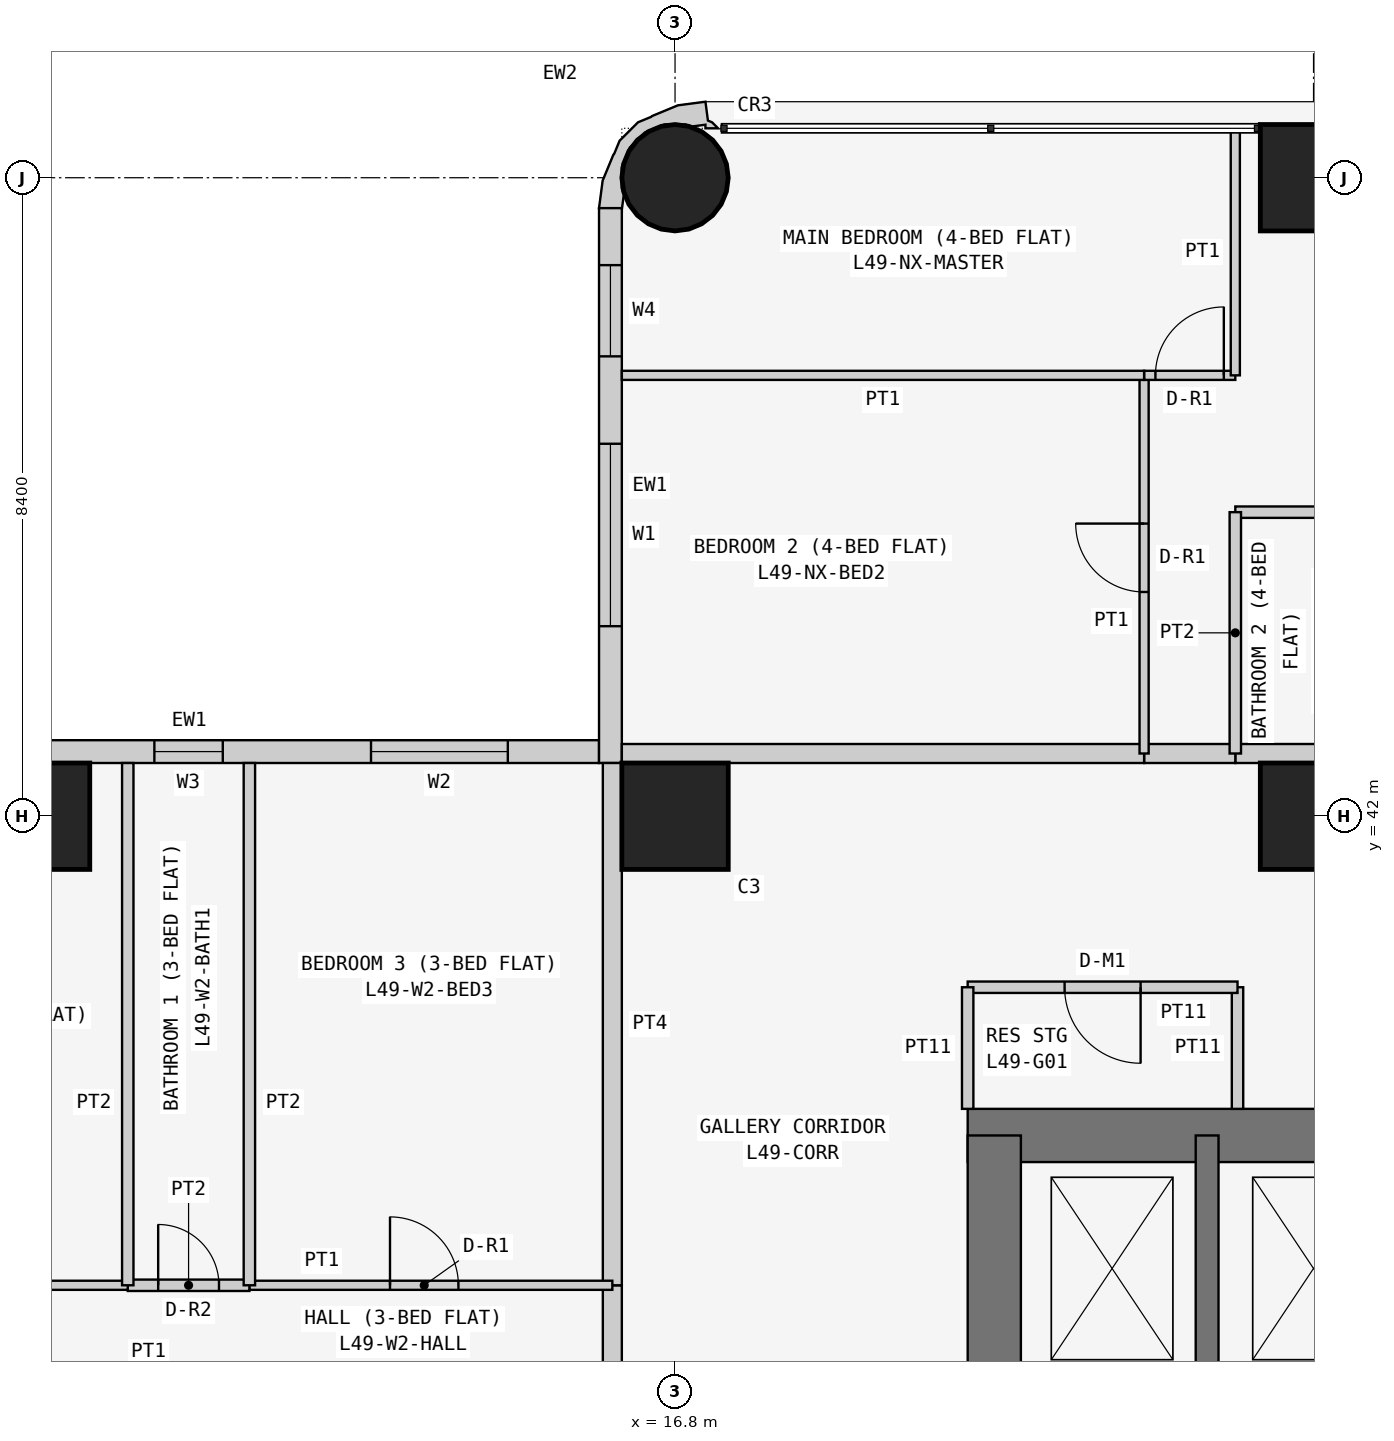
"""IFC4 building model, lengths in metres.
Left out: names, types, materials, properties, quantities, classifications, styles, units other than length and angle.
Written with IfcOpenShell. Run it as: python <this file> out.ifc"""

import sys

from ifc_helpers import new_model, si_unit, direction, frame, frame_2d, origin, origin_2d, place, context, subcontext, project, spatial, polyline, rectangle, circle, outline, extrude, element, fill, save


model = new_model("IFC4")
c1 = context("Model", 3, precision=1e-05, world=origin(), true_north=direction((0.0, 1.0)))
c2 = subcontext(c1, "Body", "Model", "MODEL_VIEW")
j1 = project(units=[si_unit("LENGTHUNIT", "METRE"), si_unit("PLANEANGLEUNIT", "RADIAN")], contexts=[c1])
p1 = place(None, origin())
s1 = spatial("IfcSite", under=j1, at=p1, CompositionType="ELEMENT")
p2 = place(p1, origin())
s2 = spatial("IfcBuilding", under=s1, at=p2, CompositionType="ELEMENT")
p3 = place(p2, frame((0.0, 0.0, 190.5)))
s3 = spatial("IfcBuildingStorey", under=s2, at=p3, CompositionType="ELEMENT", Elevation=190.5)
for number, where, z_axis, x_axis in (
    (1, (8.4, 42.0, 0.0), (0.0, 0.0, 1.0), (1.0, 0.0, 0.0)),
    (2, (16.8, 42.0, 0.0), (0.0, 0.0, 1.0), (1.0, 0.0, 0.0)),
):
    element("IfcColumn", number, at=place(p3, frame(where, z_axis=z_axis, x_axis=x_axis)), inside=s3, PredefinedType="COLUMN", context=c2, shape_type="SweptSolid", body=[
        extrude(rectangle(XDim=1.4, YDim=1.4, at=origin_2d()), origin(), (0.0, 0.0, 1.0), 3.6),
    ])
p4 = place(p3, frame((16.8, 50.4, 0.0), z_axis=(0.0, 0.0, 1.0), x_axis=(1.0, 0.0, 0.0)))
e3 = element("IfcColumn", 3, at=p4, inside=s3, PredefinedType="COLUMN", context=c2, shape_type="SweptSolid", body=[
    extrude(circle(Radius=0.7, at=origin_2d()), origin(), (0.0, 0.0, 1.0), 3.6),
])
for number, where, z_axis, x_axis in (
    (4, (25.2, 42.0, 0.0), (0.0, 0.0, 1.0), (1.0, 0.0, 0.0)),
    (5, (25.2, 50.4, 0.0), (0.0, 0.0, 1.0), (1.0, 0.0, 0.0)),
):
    element("IfcColumn", number, at=place(p3, frame(where, z_axis=z_axis, x_axis=x_axis)), inside=s3, PredefinedType="COLUMN", context=c2, shape_type="SweptSolid", body=[
        extrude(rectangle(XDim=1.4, YDim=1.4, at=origin_2d()), origin(), (0.0, 0.0, 1.0), 3.6),
    ])
p5 = place(p3, frame((37.8, 37.8, 0.0), z_axis=(0.0, 0.0, 1.0), x_axis=(-1.0, 0.0, 0.0)))
e6 = element("IfcWall", 6, at=p5, inside=s3, PredefinedType="SHEAR", context=c2, shape_type="SweptSolid", body=[
    extrude(rectangle(XDim=17.15, YDim=0.7, at=frame_2d((8.575, 0.0))), origin(), (0.0, 0.0, 1.0), 3.6),
])
p6 = place(p3, frame((21.0, 37.8, 0.0), z_axis=(0.0, 0.0, 1.0), x_axis=(0.0, -1.0, 0.0)))
e7 = element("IfcWall", 7, at=p6, inside=s3, PredefinedType="SHEAR", context=c2, shape_type="SweptSolid", body=[
    extrude(rectangle(XDim=17.15, YDim=0.7, at=frame_2d((8.575, 0.0))), origin(), (0.0, 0.0, 1.0), 3.6),
])
p7 = place(p6, frame((5.4, 0.0, 0.0)))
e8 = element("IfcOpeningElement", 8, at=p7, cuts=e7, PredefinedType="OPENING", context=c2, shape_type="SweptSolid", body=[
    extrude(rectangle(XDim=1.2, YDim=2.1, at=frame_2d((0.6, 1.05))), frame((0.0, 0.36, 0.0), z_axis=(0.0, -1.0, 0.0), x_axis=(1.0, 0.0, 0.0)), (0.0, 0.0, 1.0), 0.72),
])
p8 = place(p3, frame((23.8, 34.6, 0.0), z_axis=(0.0, 0.0, 1.0), x_axis=(0.0, 1.0, 0.0)))
e9 = element("IfcWall", 9, at=p8, inside=s3, PredefinedType="SHEAR", context=c2, shape_type="SweptSolid", body=[
    extrude(rectangle(XDim=3.2, YDim=0.3, at=frame_2d((1.6, 0.0))), origin(), (0.0, 0.0, 1.0), 3.6),
])
p9 = place(p3, frame((15.8, 42.85, 0.0), z_axis=(0.0, 0.0, 1.0), x_axis=(-1.0, 0.0, 0.0)))
e10 = element("IfcWall", 10, at=p9, inside=s3, PredefinedType="SOLIDWALL", context=c2, shape_type="SweptSolid", body=[
    extrude(rectangle(XDim=15.4, YDim=0.3, at=frame_2d((7.7, 0.0))), origin(), (0.0, 0.0, 1.0), 3.45),
])
p10 = place(p9, frame((1.2, 0.0, 0.9)))
e11 = element("IfcOpeningElement", 11, at=p10, cuts=e10, PredefinedType="OPENING", context=c2, shape_type="SweptSolid", body=[
    extrude(rectangle(XDim=1.8, YDim=1.5, at=frame_2d((0.9, 0.75))), frame((0.0, 0.16, 0.0), z_axis=(0.0, -1.0, 0.0), x_axis=(1.0, 0.0, 0.0)), (0.0, 0.0, 1.0), 0.32),
])
p11 = place(p9, frame((4.95, 0.0, 1.5)))
e12 = element("IfcOpeningElement", 12, at=p11, cuts=e10, PredefinedType="OPENING", context=c2, shape_type="SweptSolid", body=[
    extrude(rectangle(XDim=0.9, YDim=0.7, at=frame_2d((0.45, 0.35))), frame((0.0, 0.16, 0.0), z_axis=(0.0, -1.0, 0.0), x_axis=(1.0, 0.0, 0.0)), (0.0, 0.0, 1.0), 0.32),
])
p12 = place(p9, frame((8.5, 0.0, 0.9)))
e13 = element("IfcOpeningElement", 13, at=p12, cuts=e10, PredefinedType="OPENING", context=c2, shape_type="SweptSolid", body=[
    extrude(rectangle(XDim=1.8, YDim=1.5, at=frame_2d((0.9, 0.75))), frame((0.0, 0.16, 0.0), z_axis=(0.0, -1.0, 0.0), x_axis=(1.0, 0.0, 0.0)), (0.0, 0.0, 1.0), 0.32),
])
p13 = place(p9, frame((12.5, 0.0, 0.0)))
e14 = element("IfcOpeningElement", 14, at=p13, cuts=e10, PredefinedType="OPENING", context=c2, shape_type="SweptSolid", body=[
    extrude(rectangle(XDim=0.9, YDim=2.4, at=frame_2d((0.45, 1.2))), frame((0.0, 0.16, 0.0), z_axis=(0.0, -1.0, 0.0), x_axis=(1.0, 0.0, 0.0)), (0.0, 0.0, 1.0), 0.32),
])
p14 = place(p9, frame((13.5, 0.0, 0.9)))
e15 = element("IfcOpeningElement", 15, at=p14, cuts=e10, PredefinedType="OPENING", context=c2, shape_type="SweptSolid", body=[
    extrude(rectangle(XDim=1.2, YDim=1.5, at=frame_2d((0.6, 0.75))), frame((0.0, 0.16, 0.0), z_axis=(0.0, -1.0, 0.0), x_axis=(1.0, 0.0, 0.0)), (0.0, 0.0, 1.0), 0.32),
])
p15 = place(p3, frame((15.95, 50.0, 0.0), z_axis=(0.0, 0.0, 1.0), x_axis=(0.0, -1.0, 0.0)))
e16 = element("IfcWall", 16, at=p15, inside=s3, PredefinedType="SOLIDWALL", context=c2, shape_type="SweptSolid", body=[
    extrude(rectangle(XDim=7.3, YDim=0.3, at=frame_2d((3.65, 0.0))), origin(), (0.0, 0.0, 1.0), 3.45),
])
p16 = place(p15, frame((3.1, 0.0, 0.9)))
e17 = element("IfcOpeningElement", 17, at=p16, cuts=e16, PredefinedType="OPENING", context=c2, shape_type="SweptSolid", body=[
    extrude(rectangle(XDim=2.4, YDim=1.5, at=frame_2d((1.2, 0.75))), frame((0.0, 0.16, 0.0), z_axis=(0.0, -1.0, 0.0), x_axis=(1.0, 0.0, 0.0)), (0.0, 0.0, 1.0), 0.32),
])
p17 = place(p15, frame((0.75, 0.0, 0.9)))
e18 = element("IfcOpeningElement", 18, at=p17, cuts=e16, PredefinedType="OPENING", context=c2, shape_type="SweptSolid", body=[
    extrude(rectangle(XDim=1.2, YDim=1.5, at=frame_2d((0.6, 0.75))), frame((0.0, 0.16, 0.0), z_axis=(0.0, -1.0, 0.0), x_axis=(1.0, 0.0, 0.0)), (0.0, 0.0, 1.0), 0.32),
])
p18 = place(p3, frame((17.312, 50.988, 0.0), z_axis=(0.0, 0.0, 1.0), x_axis=(-0.439933741929, 0.898030234854, 0.0)))
e19 = element("IfcWall", 19, at=p18, inside=s3, PredefinedType="SOLIDWALL", context=c2, shape_type="SweptSolid", body=[
    extrude(outline(polyline([(0.138, -0.039), (0.182, -0.0), (0.419, -0.08), (0.536, 0.266), (0.559, 0.631), (0.555, 0.651), (0.566, 0.836), (0.456, 1.159), (0.333, 1.298), (0.324, 1.316), (0.082, 1.591), (-0.222, 1.793), (-0.39, 1.541), (-0.372, 1.532), (-0.195, 1.414), (-0.12, 1.41), (0.131, 1.287), (0.315, 1.078), (0.406, 0.814), (0.388, 0.536), (0.265, 0.285), (0.209, 0.236), (0.148, 0.053), (0.105, 0.074), (0.032, -0.076), (0.138, -0.039)])), origin(), (0.0, 0.0, 1.0), 3.45),
])
p19 = place(p3, frame((24.2, 38.15, 0.0), z_axis=(0.0, 0.0, 1.0), x_axis=(0.0, 1.0, 0.0)))
e20 = element("IfcWall", 20, at=p19, inside=s3, PredefinedType="PARTITIONING", context=c2, shape_type="SweptSolid", body=[
    extrude(rectangle(XDim=1.6, YDim=0.15, at=frame_2d((0.8, 0.0))), origin(), (0.0, 0.0, 1.0), 3.45),
])
p20 = place(p3, frame((24.2, 39.75, 0.0), z_axis=(0.0, 0.0, 1.0), x_axis=(-1.0, 0.0, 0.0)))
e21 = element("IfcWall", 21, at=p20, inside=s3, PredefinedType="PARTITIONING", context=c2, shape_type="SweptSolid", body=[
    extrude(rectangle(XDim=3.55, YDim=0.15, at=frame_2d((1.775, 0.0))), origin(), (0.0, 0.0, 1.0), 3.45),
])
p21 = place(p20, frame((1.275, 0.0, 0.0)))
e22 = element("IfcOpeningElement", 22, at=p21, cuts=e21, PredefinedType="OPENING", context=c2, shape_type="SweptSolid", body=[
    extrude(rectangle(XDim=1.0, YDim=2.1, at=frame_2d((0.5, 1.05))), frame((0.0, 0.085, 0.0), z_axis=(0.0, -1.0, 0.0), x_axis=(1.0, 0.0, 0.0)), (0.0, 0.0, 1.0), 0.17),
])
p22 = place(p3, frame((20.65, 39.75, 0.0), z_axis=(0.0, 0.0, 1.0), x_axis=(0.0, -1.0, 0.0)))
e23 = element("IfcWall", 23, at=p22, inside=s3, PredefinedType="PARTITIONING", context=c2, shape_type="SweptSolid", body=[
    extrude(rectangle(XDim=1.6, YDim=0.15, at=frame_2d((0.8, 0.0))), origin(), (0.0, 0.0, 1.0), 3.45),
])
p23 = place(p3, frame((24.171, 42.825, 0.0), z_axis=(0.0, 0.0, 1.0), x_axis=(1.0, 0.0, 0.0)))
e24 = element("IfcWall", 24, at=p23, inside=s3, PredefinedType="PARTITIONING", context=c2, shape_type="SweptSolid", body=[
    extrude(rectangle(XDim=2.629, YDim=0.25, at=frame_2d((1.314, 0.0))), origin(), (0.0, 0.0, 1.0), 3.45),
])
p24 = place(p3, frame((22.971, 42.825, 0.0), z_axis=(0.0, 0.0, 1.0), x_axis=(1.0, 0.0, 0.0)))
e25 = element("IfcWall", 25, at=p24, inside=s3, PredefinedType="PARTITIONING", context=c2, shape_type="SweptSolid", body=[
    extrude(rectangle(XDim=1.2, YDim=0.25, at=frame_2d((0.6, 0.0))), origin(), (0.0, 0.0, 1.0), 3.45),
])
p25 = place(p3, frame((16.1, 42.825, 0.0), z_axis=(0.0, 0.0, 1.0), x_axis=(1.0, 0.0, 0.0)))
e26 = element("IfcWall", 26, at=p25, inside=s3, PredefinedType="PARTITIONING", context=c2, shape_type="SweptSolid", body=[
    extrude(rectangle(XDim=6.871, YDim=0.25, at=frame_2d((3.436, 0.0))), origin(), (0.0, 0.0, 1.0), 3.45),
])
p26 = place(p3, frame((15.975, 34.629, 0.0), z_axis=(0.0, 0.0, 1.0), x_axis=(0.0, 1.0, 0.0)))
e27 = element("IfcWall", 27, at=p26, inside=s3, PredefinedType="PARTITIONING", context=c2, shape_type="SweptSolid", body=[
    extrude(rectangle(XDim=1.2, YDim=0.25, at=frame_2d((0.6, 0.0))), origin(), (0.0, 0.0, 1.0), 3.45),
])
p27 = place(p3, frame((15.975, 35.829, 0.0), z_axis=(0.0, 0.0, 1.0), x_axis=(0.0, 1.0, 0.0)))
e28 = element("IfcWall", 28, at=p27, inside=s3, PredefinedType="PARTITIONING", context=c2, shape_type="SweptSolid", body=[
    extrude(rectangle(XDim=6.871, YDim=0.25, at=frame_2d((3.436, 0.0))), origin(), (0.0, 0.0, 1.0), 3.45),
])
p28 = place(p3, frame((26.8, 46.0, 0.0), z_axis=(0.0, 0.0, 1.0), x_axis=(-1.0, 0.0, 0.0)))
e29 = element("IfcWall", 29, at=p28, inside=s3, PredefinedType="PARTITIONING", context=c2, shape_type="SweptSolid", body=[
    extrude(rectangle(XDim=2.629, YDim=0.15, at=frame_2d((1.314, 0.0))), origin(), (0.0, 0.0, 1.0), 3.45),
])
p29 = place(p3, frame((24.171, 46.0, 0.0), z_axis=(0.0, 0.0, 1.0), x_axis=(0.0, -1.0, 0.0)))
e30 = element("IfcWall", 30, at=p29, inside=s3, PredefinedType="PARTITIONING", context=c2, shape_type="SweptSolid", body=[
    extrude(rectangle(XDim=3.175, YDim=0.15, at=frame_2d((1.587, 0.0))), origin(), (0.0, 0.0, 1.0), 3.45),
])
p30 = place(p3, frame((22.971, 42.825, 0.0), z_axis=(0.0, 0.0, 1.0), x_axis=(0.0, 1.0, 0.0)))
e31 = element("IfcWall", 31, at=p30, inside=s3, PredefinedType="PARTITIONING", context=c2, shape_type="SweptSolid", body=[
    extrude(rectangle(XDim=4.975, YDim=0.12, at=frame_2d((2.488, 0.0))), origin(), (0.0, 0.0, 1.0), 3.45),
])
p31 = place(p30, frame((2.125, 0.0, 0.0)))
e32 = element("IfcOpeningElement", 32, at=p31, cuts=e31, PredefinedType="OPENING", context=c2, shape_type="SweptSolid", body=[
    extrude(rectangle(XDim=0.9, YDim=2.1, at=frame_2d((0.45, 1.05))), frame((0.0, 0.07, 0.0), z_axis=(0.0, -1.0, 0.0), x_axis=(1.0, 0.0, 0.0)), (0.0, 0.0, 1.0), 0.14),
])
p32 = place(p3, frame((22.971, 47.8, 0.0), z_axis=(0.0, 0.0, 1.0), x_axis=(1.0, 0.0, 0.0)))
e33 = element("IfcWall", 33, at=p32, inside=s3, PredefinedType="PARTITIONING", context=c2, shape_type="SweptSolid", body=[
    extrude(rectangle(XDim=1.2, YDim=0.12, at=frame_2d((0.6, 0.0))), origin(), (0.0, 0.0, 1.0), 3.45),
])
p33 = place(p32, frame((0.149, 0.0, 0.0)))
e34 = element("IfcOpeningElement", 34, at=p33, cuts=e33, PredefinedType="OPENING", context=c2, shape_type="SweptSolid", body=[
    extrude(rectangle(XDim=0.9, YDim=2.1, at=frame_2d((0.45, 1.05))), frame((0.0, 0.07, 0.0), z_axis=(0.0, -1.0, 0.0), x_axis=(1.0, 0.0, 0.0)), (0.0, 0.0, 1.0), 0.14),
])
p34 = place(p3, frame((24.171, 47.8, 0.0), z_axis=(0.0, 0.0, 1.0), x_axis=(0.0, 1.0, 0.0)))
e35 = element("IfcWall", 35, at=p34, inside=s3, PredefinedType="PARTITIONING", context=c2, shape_type="SweptSolid", body=[
    extrude(rectangle(XDim=3.25, YDim=0.12, at=frame_2d((1.625, 0.0))), origin(), (0.0, 0.0, 1.0), 3.45),
])
p35 = place(p3, frame((22.971, 47.8, 0.0), z_axis=(0.0, 0.0, 1.0), x_axis=(-1.0, 0.0, 0.0)))
e36 = element("IfcWall", 36, at=p35, inside=s3, PredefinedType="PARTITIONING", context=c2, shape_type="SweptSolid", body=[
    extrude(rectangle(XDim=6.871, YDim=0.12, at=frame_2d((3.436, 0.0))), origin(), (0.0, 0.0, 1.0), 3.45),
])
p36 = place(p3, frame((11.2, 35.829, 0.0), z_axis=(0.0, 0.0, 1.0), x_axis=(1.0, 0.0, 0.0)))
e37 = element("IfcWall", 37, at=p36, inside=s3, PredefinedType="PARTITIONING", context=c2, shape_type="SweptSolid", body=[
    extrude(rectangle(XDim=4.775, YDim=0.12, at=frame_2d((2.388, 0.0))), origin(), (0.0, 0.0, 1.0), 3.45),
])
p37 = place(p36, frame((1.85, 0.0, 0.0)))
e38 = element("IfcOpeningElement", 38, at=p37, cuts=e37, PredefinedType="OPENING", context=c2, shape_type="SweptSolid", body=[
    extrude(rectangle(XDim=0.9, YDim=2.1, at=frame_2d((0.45, 1.05))), frame((0.0, 0.07, 0.0), z_axis=(0.0, -1.0, 0.0), x_axis=(1.0, 0.0, 0.0)), (0.0, 0.0, 1.0), 0.14),
])
p38 = place(p3, frame((9.6, 35.829, 0.0), z_axis=(0.0, 0.0, 1.0), x_axis=(1.0, 0.0, 0.0)))
e39 = element("IfcWall", 39, at=p38, inside=s3, PredefinedType="PARTITIONING", context=c2, shape_type="SweptSolid", body=[
    extrude(rectangle(XDim=1.6, YDim=0.15, at=frame_2d((0.8, 0.0))), origin(), (0.0, 0.0, 1.0), 3.45),
])
p39 = place(p38, frame((0.4, 0.0, 0.0)))
e40 = element("IfcOpeningElement", 40, at=p39, cuts=e39, PredefinedType="OPENING", context=c2, shape_type="SweptSolid", body=[
    extrude(rectangle(XDim=0.8, YDim=2.1, at=frame_2d((0.4, 1.05))), frame((0.0, 0.085, 0.0), z_axis=(0.0, -1.0, 0.0), x_axis=(1.0, 0.0, 0.0)), (0.0, 0.0, 1.0), 0.17),
])
p40 = place(p3, frame((5.2, 35.829, 0.0), z_axis=(0.0, 0.0, 1.0), x_axis=(1.0, 0.0, 0.0)))
e41 = element("IfcWall", 41, at=p40, inside=s3, PredefinedType="PARTITIONING", context=c2, shape_type="SweptSolid", body=[
    extrude(rectangle(XDim=4.4, YDim=0.12, at=frame_2d((2.2, 0.0))), origin(), (0.0, 0.0, 1.0), 3.45),
])
p41 = place(p40, frame((1.15, 0.0, 0.0)))
e42 = element("IfcOpeningElement", 42, at=p41, cuts=e41, PredefinedType="OPENING", context=c2, shape_type="SweptSolid", body=[
    extrude(rectangle(XDim=0.9, YDim=2.1, at=frame_2d((0.45, 1.05))), frame((0.0, 0.07, 0.0), z_axis=(0.0, -1.0, 0.0), x_axis=(1.0, 0.0, 0.0)), (0.0, 0.0, 1.0), 0.14),
])
for number, where, z_axis, x_axis in (
    (43, (11.2, 35.829, 0.0), (0.0, 0.0, 1.0), (0.0, 1.0, 0.0)),
    (44, (9.6, 35.829, 0.0), (0.0, 0.0, 1.0), (0.0, 1.0, 0.0)),
):
    element("IfcWall", number, at=place(p3, frame(where, z_axis=z_axis, x_axis=x_axis)), inside=s3, PredefinedType="PARTITIONING", context=c2, shape_type="SweptSolid", body=[
        extrude(rectangle(XDim=6.871, YDim=0.15, at=frame_2d((3.436, 0.0))), origin(), (0.0, 0.0, 1.0), 3.45),
    ])
p42 = place(p16, origin())
e45 = element("IfcWindow", 45, at=p42, inside=s3, PartitioningType="SINGLE_PANEL", PredefinedType="WINDOW", context=c2, shape_type="SweptSolid", body=[
    extrude(rectangle(XDim=2.4, YDim=1.5, at=frame_2d((1.2, 0.75))), frame((0.0, 0.03, 0.0), z_axis=(0.0, -1.0, 0.0), x_axis=(1.0, 0.0, 0.0)), (0.0, 0.0, 1.0), 0.06),
])
fill(e17, e45)
p43 = place(p17, origin())
e46 = element("IfcWindow", 46, at=p43, inside=s3, PartitioningType="SINGLE_PANEL", PredefinedType="WINDOW", context=c2, shape_type="SweptSolid", body=[
    extrude(rectangle(XDim=1.2, YDim=1.5, at=frame_2d((0.6, 0.75))), frame((0.0, 0.03, 0.0), z_axis=(0.0, -1.0, 0.0), x_axis=(1.0, 0.0, 0.0)), (0.0, 0.0, 1.0), 0.06),
])
fill(e18, e46)
p44 = place(p10, origin())
e47 = element("IfcWindow", 47, at=p44, inside=s3, PartitioningType="SINGLE_PANEL", PredefinedType="WINDOW", context=c2, shape_type="SweptSolid", body=[
    extrude(rectangle(XDim=1.8, YDim=1.5, at=frame_2d((0.9, 0.75))), frame((0.0, 0.03, 0.0), z_axis=(0.0, -1.0, 0.0), x_axis=(1.0, 0.0, 0.0)), (0.0, 0.0, 1.0), 0.06),
])
fill(e11, e47)
p45 = place(p11, origin())
e48 = element("IfcWindow", 48, at=p45, inside=s3, PartitioningType="SINGLE_PANEL", PredefinedType="WINDOW", context=c2, shape_type="SweptSolid", body=[
    extrude(rectangle(XDim=0.9, YDim=0.7, at=frame_2d((0.45, 0.35))), frame((0.0, 0.03, 0.0), z_axis=(0.0, -1.0, 0.0), x_axis=(1.0, 0.0, 0.0)), (0.0, 0.0, 1.0), 0.06),
])
fill(e12, e48)
p46 = place(p21, origin())
e49 = element("IfcDoor", 49, at=p46, inside=s3, OperationType="SINGLE_SWING_LEFT", PredefinedType="DOOR", context=c2, shape_type="SweptSolid", body=[
    extrude(rectangle(XDim=1.0, YDim=2.1, at=frame_2d((0.5, 1.05))), frame((0.0, 0.025, 0.0), z_axis=(0.0, -1.0, 0.0), x_axis=(1.0, 0.0, 0.0)), (0.0, 0.0, 1.0), 0.05),
])
fill(e22, e49)
p47 = place(p31, origin())
e50 = element("IfcDoor", 50, at=p47, inside=s3, OperationType="SINGLE_SWING_RIGHT", PredefinedType="DOOR", context=c2, shape_type="SweptSolid", body=[
    extrude(rectangle(XDim=0.9, YDim=2.1, at=frame_2d((0.45, 1.05))), frame((0.0, 0.025, 0.0), z_axis=(0.0, -1.0, 0.0), x_axis=(1.0, 0.0, 0.0)), (0.0, 0.0, 1.0), 0.05),
])
fill(e32, e50)
p48 = place(p33, origin())
e51 = element("IfcDoor", 51, at=p48, inside=s3, OperationType="SINGLE_SWING_RIGHT", PredefinedType="DOOR", context=c2, shape_type="SweptSolid", body=[
    extrude(rectangle(XDim=0.9, YDim=2.1, at=frame_2d((0.45, 1.05))), frame((0.0, 0.025, 0.0), z_axis=(0.0, -1.0, 0.0), x_axis=(1.0, 0.0, 0.0)), (0.0, 0.0, 1.0), 0.05),
])
fill(e34, e51)
p49 = place(p37, origin())
e52 = element("IfcDoor", 52, at=p49, inside=s3, OperationType="SINGLE_SWING_LEFT", PredefinedType="DOOR", context=c2, shape_type="SweptSolid", body=[
    extrude(rectangle(XDim=0.9, YDim=2.1, at=frame_2d((0.45, 1.05))), frame((0.0, 0.025, 0.0), z_axis=(0.0, -1.0, 0.0), x_axis=(1.0, 0.0, 0.0)), (0.0, 0.0, 1.0), 0.05),
])
fill(e38, e52)
p50 = place(p39, origin())
e53 = element("IfcDoor", 53, at=p50, inside=s3, OperationType="SINGLE_SWING_LEFT", PredefinedType="DOOR", context=c2, shape_type="SweptSolid", body=[
    extrude(rectangle(XDim=0.8, YDim=2.1, at=frame_2d((0.4, 1.05))), frame((0.0, 0.025, 0.0), z_axis=(0.0, -1.0, 0.0), x_axis=(1.0, 0.0, 0.0)), (0.0, 0.0, 1.0), 0.05),
])
fill(e40, e53)
save(model, sys.argv[1])
